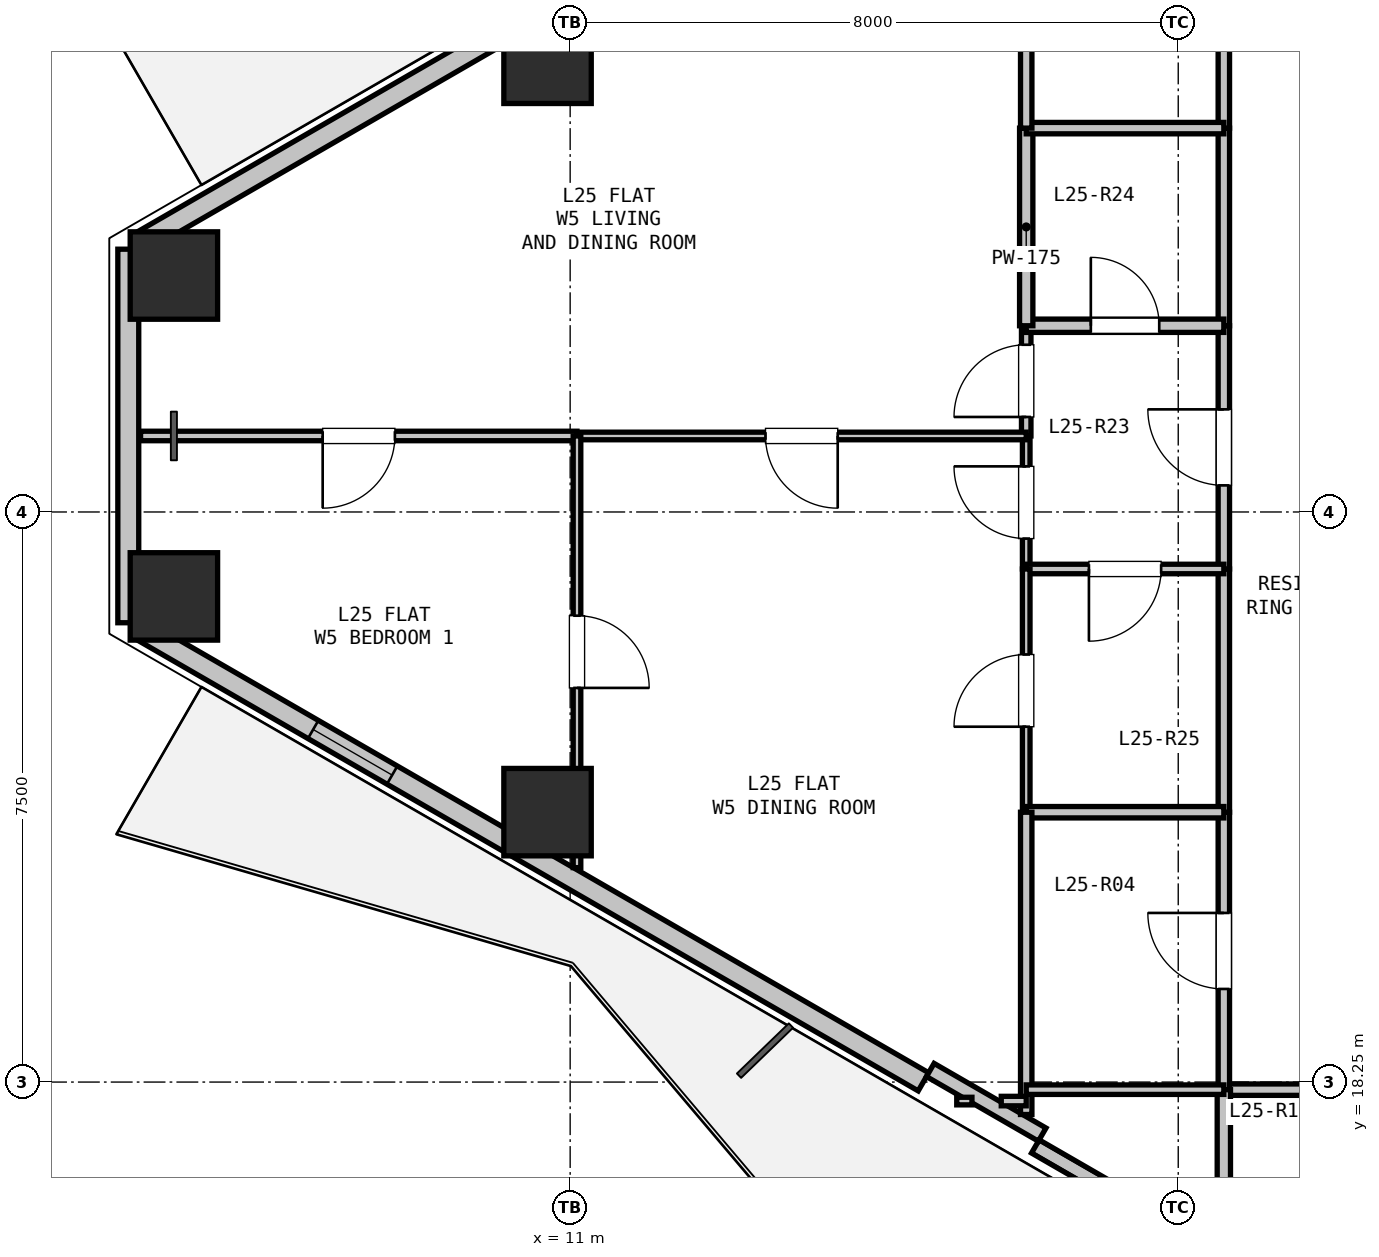
"""IFC4 building model, lengths in metres.
Left out: names, types, materials, properties, quantities, classifications, styles, units other than length and angle.
Written with IfcOpenShell. Run it as: python <this file> out.ifc"""

import sys

from ifc_helpers import new_model, si_unit, direction, frame, frame_2d, origin, origin_2d, place, context, subcontext, project, spatial, rectangle, hollow_rectangle, extrude, element, fill, save


model = new_model("IFC4")
c1 = context("Model", 3, precision=1e-05, world=origin(), true_north=direction((0.0, 1.0)))
c2 = subcontext(c1, "Body", "Model", "MODEL_VIEW")
j1 = project(units=[si_unit("LENGTHUNIT", "METRE"), si_unit("PLANEANGLEUNIT", "RADIAN")], contexts=[c1])
p1 = place(None, origin())
s1 = spatial("IfcSite", under=j1, at=p1, CompositionType="ELEMENT")
p2 = place(p1, origin())
s2 = spatial("IfcBuilding", under=s1, at=p2, CompositionType="ELEMENT")
p3 = place(p2, frame((0.0, 0.0, 93.3)))
s3 = spatial("IfcBuildingStorey", under=s2, at=p3, CompositionType="ELEMENT", Elevation=93.3)
for number, where, z_axis, x_axis in (
    (1, (5.787, 28.861, 0.0), (0.0, 0.0, 1.0), (1.0, 0.0, 0.0)),
    (2, (10.702, 31.699, 0.0), (0.0, 0.0, 1.0), (1.0, 0.0, 0.0)),
    (3, (10.702, 21.801, 0.0), (0.0, 0.0, 1.0), (1.0, 0.0, 0.0)),
    (4, (5.787, 24.639, 0.0), (0.0, 0.0, 1.0), (1.0, 0.0, 0.0)),
):
    element("IfcColumn", number, at=place(p3, frame(where, z_axis=z_axis, x_axis=x_axis)), inside=s3, PredefinedType="COLUMN", context=c2, shape_type="SweptSolid", body=[
        extrude(hollow_rectangle(XDim=1.15, YDim=1.15, WallThickness=0.032, at=origin_2d()), origin(), (0.0, 0.0, 1.0), 3.3),
    ])
p4 = place(p3, frame((5.187, 24.293, 0.0), z_axis=(0.0, 0.0, 1.0), x_axis=(0.0, 1.0, 0.0)))
e5 = element("IfcWall", 5, at=p4, inside=s3, PredefinedType="SOLIDWALL", context=c2, shape_type="SweptSolid", body=[
    extrude(rectangle(XDim=4.915, YDim=0.275, at=frame_2d((2.457, 0.0))), origin(), (0.0, 0.0, 1.0), 2.67),
])
p5 = place(p3, frame((5.317, 29.282, 0.0), z_axis=(0.0, 0.0, 1.0), x_axis=(0.866023023012, 0.500004123596, 0.0)))
e6 = element("IfcWall", 6, at=p5, inside=s3, PredefinedType="SOLIDWALL", context=c2, shape_type="SweptSolid", body=[
    extrude(rectangle(XDim=11.93, YDim=0.275, at=frame_2d((5.965, 0.0))), origin(), (0.0, 0.0, 1.0), 2.67),
])
p6 = place(p5, frame((8.704, 0.0, 0.0)))
e7 = element("IfcOpeningElement", 7, at=p6, cuts=e6, PredefinedType="OPENING", context=c2, shape_type="SweptSolid", body=[
    extrude(rectangle(XDim=1.1, YDim=2.1, at=frame_2d((0.55, 1.05))), frame((0.0, 0.147, 0.0), z_axis=(0.0, -1.0, 0.0), x_axis=(1.0, 0.0, 0.0)), (0.0, 0.0, 1.0), 0.295),
])
p7 = place(p3, frame((26.845, 11.788, 0.0), z_axis=(0.0, 0.0, 1.0), x_axis=(-0.866027010039, 0.499997217876, 0.0)))
e8 = element("IfcWall", 8, at=p7, inside=s3, PredefinedType="PARAPET", context=c2, shape_type="SweptSolid", body=[
    extrude(rectangle(XDim=11.229, YDim=0.2, at=frame_2d((5.615, 0.0))), origin(), (0.0, 0.0, 1.0), 0.2),
])
p8 = place(p3, frame((15.648, 18.253, 0.0), z_axis=(0.0, 0.0, 1.0), x_axis=(-0.866023023012, 0.500004123596, 0.0)))
e9 = element("IfcWall", 9, at=p8, inside=s3, PredefinedType="SOLIDWALL", context=c2, shape_type="SweptSolid", body=[
    extrude(rectangle(XDim=11.93, YDim=0.275, at=frame_2d((5.965, 0.0))), origin(), (0.0, 0.0, 1.0), 2.67),
])
p9 = place(p8, frame((8.071, 0.0, 0.9)))
e10 = element("IfcOpeningElement", 10, at=p9, cuts=e9, PredefinedType="OPENING", context=c2, shape_type="SweptSolid", body=[
    extrude(rectangle(XDim=1.2, YDim=1.4, at=frame_2d((0.6, 0.7))), frame((0.0, 0.147, 0.0), z_axis=(0.0, -1.0, 0.0), x_axis=(1.0, 0.0, 0.0)), (0.0, 0.0, 1.0), 0.295),
])
p10 = place(p3, frame((17.21, 17.559, 0.0), z_axis=(0.0, 0.0, 1.0), x_axis=(-0.866025371046, 0.500000056704, 0.0)))
e11 = element("IfcWall", 11, at=p10, inside=s3, PredefinedType="PARAPET", context=c2, shape_type="SweptSolid", body=[
    extrude(rectangle(XDim=1.7, YDim=0.2, at=frame_2d((0.85, 0.0))), origin(), (0.0, 0.0, 1.0), 2.67),
])
p11 = place(p3, frame((21.6, 18.15, 0.0), z_axis=(0.0, 0.0, 1.0), x_axis=(-1.0, 0.0, 0.0)))
e12 = element("IfcWall", 12, at=p11, inside=s3, PredefinedType="PARTITIONING", context=c2, shape_type="SweptSolid", body=[
    extrude(rectangle(XDim=2.0, YDim=0.15, at=frame_2d((1.0, 0.0))), origin(), (0.0, 0.0, 1.0), 3.05),
])
p12 = place(p3, frame((19.6, 18.15, 0.0), z_axis=(0.0, 0.0, 1.0), x_axis=(0.0, 1.0, 0.0)))
e13 = element("IfcWall", 13, at=p12, inside=s3, PredefinedType="PARTITIONING", context=c2, shape_type="SweptSolid", body=[
    extrude(rectangle(XDim=3.65, YDim=0.15, at=frame_2d((1.825, 0.0))), origin(), (0.0, 0.0, 1.0), 2.423),
])
p13 = place(p12, frame((1.325, 0.0, 0.0)))
e14 = element("IfcOpeningElement", 14, at=p13, cuts=e13, PredefinedType="OPENING", context=c2, shape_type="SweptSolid", body=[
    extrude(rectangle(XDim=1.0, YDim=2.15, at=frame_2d((0.5, 1.075))), frame((0.0, 0.085, 0.0), z_axis=(0.0, -1.0, 0.0), x_axis=(1.0, 0.0, 0.0)), (0.0, 0.0, 1.0), 0.17),
])
p14 = place(p3, frame((19.6, 21.8, 0.0), z_axis=(0.0, 0.0, 1.0), x_axis=(0.0, 1.0, 0.0)))
e15 = element("IfcWall", 15, at=p14, inside=s3, PredefinedType="PARTITIONING", context=c2, shape_type="SweptSolid", body=[
    extrude(rectangle(XDim=3.2, YDim=0.15, at=frame_2d((1.6, 0.0))), origin(), (0.0, 0.0, 1.0), 3.05),
])
p15 = place(p3, frame((19.6, 25.0, 0.0), z_axis=(0.0, 0.0, 1.0), x_axis=(0.0, 1.0, 0.0)))
e16 = element("IfcWall", 16, at=p15, inside=s3, PredefinedType="PARTITIONING", context=c2, shape_type="SweptSolid", body=[
    extrude(rectangle(XDim=3.2, YDim=0.15, at=frame_2d((1.6, 0.0))), origin(), (0.0, 0.0, 1.0), 3.05),
])
p16 = place(p15, frame((1.1, 0.0, 0.0)))
e17 = element("IfcOpeningElement", 17, at=p16, cuts=e16, PredefinedType="OPENING", context=c2, shape_type="SweptSolid", body=[
    extrude(rectangle(XDim=1.0, YDim=2.15, at=frame_2d((0.5, 1.075))), frame((0.0, 0.085, 0.0), z_axis=(0.0, -1.0, 0.0), x_axis=(1.0, 0.0, 0.0)), (0.0, 0.0, 1.0), 0.17),
])
p17 = place(p3, frame((19.6, 28.2, 0.0), z_axis=(0.0, 0.0, 1.0), x_axis=(0.0, 1.0, 0.0)))
e18 = element("IfcWall", 18, at=p17, inside=s3, PredefinedType="PARTITIONING", context=c2, shape_type="SweptSolid", body=[
    extrude(rectangle(XDim=2.6, YDim=0.15, at=frame_2d((1.3, 0.0))), origin(), (0.0, 0.0, 1.0), 3.05),
])
p18 = place(p3, frame((19.6, 30.8, 0.0), z_axis=(0.0, 0.0, 1.0), x_axis=(0.0, 1.0, 0.0)))
e19 = element("IfcWall", 19, at=p18, inside=s3, PredefinedType="PARTITIONING", context=c2, shape_type="SweptSolid", body=[
    extrude(rectangle(XDim=4.55, YDim=0.15, at=frame_2d((2.275, 0.0))), origin(), (0.0, 0.0, 1.0), 2.423),
])
p19 = place(p18, frame((1.775, 0.0, 0.0)))
e20 = element("IfcOpeningElement", 20, at=p19, cuts=e19, PredefinedType="OPENING", context=c2, shape_type="SweptSolid", body=[
    extrude(rectangle(XDim=1.0, YDim=2.15, at=frame_2d((0.5, 1.075))), frame((0.0, 0.085, 0.0), z_axis=(0.0, -1.0, 0.0), x_axis=(1.0, 0.0, 0.0)), (0.0, 0.0, 1.0), 0.17),
])
p20 = place(p3, frame((17.0, 25.0, 0.0), z_axis=(0.0, 0.0, 1.0), x_axis=(0.0, 1.0, 0.0)))
e21 = element("IfcWall", 21, at=p20, inside=s3, PredefinedType="PARTITIONING", context=c2, shape_type="SweptSolid", body=[
    extrude(rectangle(XDim=1.75, YDim=0.1, at=frame_2d((0.875, 0.0))), origin(), (0.0, 0.0, 1.0), 3.05),
])
p21 = place(p20, frame((0.4, 0.0, 0.0)))
e22 = element("IfcOpeningElement", 22, at=p21, cuts=e21, PredefinedType="OPENING", context=c2, shape_type="SweptSolid", body=[
    extrude(rectangle(XDim=0.95, YDim=2.1, at=frame_2d((0.475, 1.05))), frame((0.0, 0.06, 0.0), z_axis=(0.0, -1.0, 0.0), x_axis=(1.0, 0.0, 0.0)), (0.0, 0.0, 1.0), 0.12),
])
p22 = place(p3, frame((17.0, 26.75, 0.0), z_axis=(0.0, 0.0, 1.0), x_axis=(0.0, 1.0, 0.0)))
e23 = element("IfcWall", 23, at=p22, inside=s3, PredefinedType="PARTITIONING", context=c2, shape_type="SweptSolid", body=[
    extrude(rectangle(XDim=1.45, YDim=0.125, at=frame_2d((0.725, 0.0))), origin(), (0.0, 0.0, 1.0), 3.05),
])
p23 = place(p22, frame((0.25, 0.0, 0.0)))
e24 = element("IfcOpeningElement", 24, at=p23, cuts=e23, PredefinedType="OPENING", context=c2, shape_type="SweptSolid", body=[
    extrude(rectangle(XDim=0.95, YDim=2.1, at=frame_2d((0.475, 1.05))), frame((0.0, 0.073, 0.0), z_axis=(0.0, -1.0, 0.0), x_axis=(1.0, 0.0, 0.0)), (0.0, 0.0, 1.0), 0.145),
])
p24 = place(p3, frame((17.0, 28.2, 0.0), z_axis=(0.0, 0.0, 1.0), x_axis=(1.0, 0.0, 0.0)))
e25 = element("IfcWall", 25, at=p24, inside=s3, PredefinedType="PLUMBINGWALL", context=c2, shape_type="SweptSolid", body=[
    extrude(rectangle(XDim=2.6, YDim=0.175, at=frame_2d((1.3, 0.0))), origin(), (0.0, 0.0, 1.0), 3.05),
])
p25 = place(p24, frame((0.85, 0.0, 0.0)))
e26 = element("IfcOpeningElement", 26, at=p25, cuts=e25, PredefinedType="OPENING", context=c2, shape_type="SweptSolid", body=[
    extrude(rectangle(XDim=0.9, YDim=2.1, at=frame_2d((0.45, 1.05))), frame((0.0, 0.097, 0.0), z_axis=(0.0, -1.0, 0.0), x_axis=(1.0, 0.0, 0.0)), (0.0, 0.0, 1.0), 0.195),
])
p26 = place(p3, frame((19.6, 25.0, 0.0), z_axis=(0.0, 0.0, 1.0), x_axis=(-1.0, 0.0, 0.0)))
e27 = element("IfcWall", 27, at=p26, inside=s3, PredefinedType="PARTITIONING", context=c2, shape_type="SweptSolid", body=[
    extrude(rectangle(XDim=2.6, YDim=0.125, at=frame_2d((1.3, 0.0))), origin(), (0.0, 0.0, 1.0), 3.05),
])
p27 = place(p26, frame((0.825, 0.0, 0.0)))
e28 = element("IfcOpeningElement", 28, at=p27, cuts=e27, PredefinedType="OPENING", context=c2, shape_type="SweptSolid", body=[
    extrude(rectangle(XDim=0.95, YDim=2.1, at=frame_2d((0.475, 1.05))), frame((0.0, 0.073, 0.0), z_axis=(0.0, -1.0, 0.0), x_axis=(1.0, 0.0, 0.0)), (0.0, 0.0, 1.0), 0.145),
])
p28 = place(p3, frame((19.6, 16.013, 0.0), z_axis=(0.0, 0.0, 1.0), x_axis=(0.0, 1.0, 0.0)))
e29 = element("IfcWall", 29, at=p28, inside=s3, PredefinedType="PLUMBINGWALL", context=c2, shape_type="SweptSolid", body=[
    extrude(rectangle(XDim=2.137, YDim=0.175, at=frame_2d((1.068, 0.0))), origin(), (0.0, 0.0, 1.0), 2.365),
])
p29 = place(p3, frame((17.0, 28.2, 0.0), z_axis=(0.0, 0.0, 1.0), x_axis=(0.0, 1.0, 0.0)))
e30 = element("IfcWall", 30, at=p29, inside=s3, PredefinedType="PLUMBINGWALL", context=c2, shape_type="SweptSolid", body=[
    extrude(rectangle(XDim=2.6, YDim=0.175, at=frame_2d((1.3, 0.0))), origin(), (0.0, 0.0, 1.0), 3.05),
])
p30 = place(p3, frame((17.0, 30.8, 0.0), z_axis=(0.0, 0.0, 1.0), x_axis=(1.0, 0.0, 0.0)))
e31 = element("IfcWall", 31, at=p30, inside=s3, PredefinedType="PARTITIONING", context=c2, shape_type="SweptSolid", body=[
    extrude(rectangle(XDim=2.6, YDim=0.15, at=frame_2d((1.3, 0.0))), origin(), (0.0, 0.0, 1.0), 3.05),
])
p31 = place(p3, frame((17.0, 21.8, 0.0), z_axis=(0.0, 0.0, 1.0), x_axis=(0.0, 1.0, 0.0)))
e32 = element("IfcWall", 32, at=p31, inside=s3, PredefinedType="PARTITIONING", context=c2, shape_type="SweptSolid", body=[
    extrude(rectangle(XDim=3.2, YDim=0.1, at=frame_2d((1.6, 0.0))), origin(), (0.0, 0.0, 1.0), 2.423),
])
p32 = place(p31, frame((1.125, 0.0, 0.0)))
e33 = element("IfcOpeningElement", 33, at=p32, cuts=e32, PredefinedType="OPENING", context=c2, shape_type="SweptSolid", body=[
    extrude(rectangle(XDim=0.95, YDim=2.1, at=frame_2d((0.475, 1.05))), frame((0.0, 0.06, 0.0), z_axis=(0.0, -1.0, 0.0), x_axis=(1.0, 0.0, 0.0)), (0.0, 0.0, 1.0), 0.12),
])
p33 = place(p3, frame((19.6, 21.8, 0.0), z_axis=(0.0, 0.0, 1.0), x_axis=(-1.0, 0.0, 0.0)))
e34 = element("IfcWall", 34, at=p33, inside=s3, PredefinedType="PARTITIONING", context=c2, shape_type="SweptSolid", body=[
    extrude(rectangle(XDim=2.6, YDim=0.15, at=frame_2d((1.3, 0.0))), origin(), (0.0, 0.0, 1.0), 2.423),
])
p34 = place(p3, frame((17.0, 30.8, 0.0), z_axis=(0.0, 0.0, 1.0), x_axis=(0.0, 1.0, 0.0)))
e35 = element("IfcWall", 35, at=p34, inside=s3, PredefinedType="PARTITIONING", context=c2, shape_type="SweptSolid", body=[
    extrude(rectangle(XDim=4.55, YDim=0.15, at=frame_2d((2.275, 0.0))), origin(), (0.0, 0.0, 1.0), 2.365),
])
p35 = place(p3, frame((17.0, 17.823, 0.0), z_axis=(0.0, 0.0, 1.0), x_axis=(0.0, 1.0, 0.0)))
e36 = element("IfcWall", 36, at=p35, inside=s3, PredefinedType="PARTITIONING", context=c2, shape_type="SweptSolid", body=[
    extrude(rectangle(XDim=3.977, YDim=0.15, at=frame_2d((1.988, 0.0))), origin(), (0.0, 0.0, 1.0), 2.365),
])
p36 = place(p3, frame((19.6, 18.15, 0.0), z_axis=(0.0, 0.0, 1.0), x_axis=(-1.0, 0.0, 0.0)))
e37 = element("IfcWall", 37, at=p36, inside=s3, PredefinedType="PARTITIONING", context=c2, shape_type="SweptSolid", body=[
    extrude(rectangle(XDim=2.6, YDim=0.125, at=frame_2d((1.3, 0.0))), origin(), (0.0, 0.0, 1.0), 2.365),
])
p37 = place(p3, frame((17.0, 26.75, 0.0), z_axis=(0.0, 0.0, 1.0), x_axis=(-1.0, 0.0, 0.0)))
e38 = element("IfcWall", 38, at=p37, inside=s3, PredefinedType="PARTITIONING", context=c2, shape_type="SweptSolid", body=[
    extrude(rectangle(XDim=5.91, YDim=0.1, at=frame_2d((2.955, 0.0))), origin(), (0.0, 0.0, 1.0), 3.05),
])
p38 = place(p37, frame((2.48, 0.0, 0.0)))
e39 = element("IfcOpeningElement", 39, at=p38, cuts=e38, PredefinedType="OPENING", context=c2, shape_type="SweptSolid", body=[
    extrude(rectangle(XDim=0.95, YDim=2.1, at=frame_2d((0.475, 1.05))), frame((0.0, 0.06, 0.0), z_axis=(0.0, -1.0, 0.0), x_axis=(1.0, 0.0, 0.0)), (0.0, 0.0, 1.0), 0.12),
])
p39 = place(p3, frame((11.09, 26.75, 0.0), z_axis=(0.0, 0.0, 1.0), x_axis=(-1.0, 0.0, 0.0)))
e40 = element("IfcWall", 40, at=p39, inside=s3, PredefinedType="PARTITIONING", context=c2, shape_type="SweptSolid", body=[
    extrude(rectangle(XDim=5.742, YDim=0.125, at=frame_2d((2.871, 0.0))), origin(), (0.0, 0.0, 1.0), 2.714),
])
p40 = place(p39, frame((2.396, 0.0, 0.0)))
e41 = element("IfcOpeningElement", 41, at=p40, cuts=e40, PredefinedType="OPENING", context=c2, shape_type="SweptSolid", body=[
    extrude(rectangle(XDim=0.95, YDim=2.1, at=frame_2d((0.475, 1.05))), frame((0.0, 0.073, 0.0), z_axis=(0.0, -1.0, 0.0), x_axis=(1.0, 0.0, 0.0)), (0.0, 0.0, 1.0), 0.145),
])
p41 = place(p3, frame((11.09, 26.75, 0.0), z_axis=(0.0, 0.0, 1.0), x_axis=(0.0, -1.0, 0.0)))
e42 = element("IfcWall", 42, at=p41, inside=s3, PredefinedType="PARTITIONING", context=c2, shape_type="SweptSolid", body=[
    extrude(rectangle(XDim=5.679, YDim=0.1, at=frame_2d((2.839, 0.0))), origin(), (0.0, 0.0, 1.0), 2.423),
])
p42 = place(p41, frame((2.365, 0.0, 0.0)))
e43 = element("IfcOpeningElement", 43, at=p42, cuts=e42, PredefinedType="OPENING", context=c2, shape_type="SweptSolid", body=[
    extrude(rectangle(XDim=0.95, YDim=2.1, at=frame_2d((0.475, 1.05))), frame((0.0, 0.06, 0.0), z_axis=(0.0, -1.0, 0.0), x_axis=(1.0, 0.0, 0.0)), (0.0, 0.0, 1.0), 0.12),
])
p43 = place(p3, frame((17.0, 18.0, 0.0), z_axis=(0.0, 0.0, 1.0), x_axis=(-1.0, 0.0, 0.0)))
e44 = element("IfcWall", 44, at=p43, inside=s3, PredefinedType="PARTITIONING", context=c2, shape_type="SweptSolid", body=[
    extrude(rectangle(XDim=0.328, YDim=0.125, at=frame_2d((0.164, 0.0))), origin(), (0.0, 0.0, 1.0), 2.714),
])
p44 = place(p3, frame((16.286, 18.0, 0.0), z_axis=(0.0, 0.0, 1.0), x_axis=(-1.0, 0.0, 0.0)))
e45 = element("IfcWall", 45, at=p44, inside=s3, PredefinedType="PARTITIONING", context=c2, shape_type="SweptSolid", body=[
    extrude(rectangle(XDim=0.2, YDim=0.1, at=frame_2d((0.1, 0.0))), origin(), (0.0, 0.0, 1.0), 3.05),
])
p45 = place(p9, origin())
e46 = element("IfcWindow", 46, at=p45, inside=s3, PartitioningType="SINGLE_PANEL", PredefinedType="WINDOW", context=c2, shape_type="SweptSolid", body=[
    extrude(rectangle(XDim=1.2, YDim=1.4, at=frame_2d((0.6, 0.7))), frame((0.0, 0.03, 0.0), z_axis=(0.0, -1.0, 0.0), x_axis=(1.0, 0.0, 0.0)), (0.0, 0.0, 1.0), 0.06),
])
fill(e10, e46)
p46 = place(p16, origin())
e47 = element("IfcDoor", 47, at=p46, inside=s3, OperationType="SINGLE_SWING_RIGHT", PredefinedType="DOOR", context=c2, shape_type="SweptSolid", body=[
    extrude(rectangle(XDim=1.0, YDim=2.15, at=frame_2d((0.5, 1.075))), frame((0.0, 0.025, 0.0), z_axis=(0.0, -1.0, 0.0), x_axis=(1.0, 0.0, 0.0)), (0.0, 0.0, 1.0), 0.05),
])
fill(e17, e47)
p47 = place(p13, origin())
e48 = element("IfcDoor", 48, at=p47, inside=s3, OperationType="SINGLE_SWING_RIGHT", PredefinedType="DOOR", context=c2, shape_type="SweptSolid", body=[
    extrude(rectangle(XDim=1.0, YDim=2.15, at=frame_2d((0.5, 1.075))), frame((0.0, 0.025, 0.0), z_axis=(0.0, -1.0, 0.0), x_axis=(1.0, 0.0, 0.0)), (0.0, 0.0, 1.0), 0.05),
])
fill(e14, e48)
p48 = place(p25, origin())
e49 = element("IfcDoor", 49, at=p48, inside=s3, OperationType="SINGLE_SWING_LEFT", PredefinedType="DOOR", context=c2, shape_type="SweptSolid", body=[
    extrude(rectangle(XDim=0.9, YDim=2.1, at=frame_2d((0.45, 1.05))), frame((0.0, 0.025, 0.0), z_axis=(0.0, -1.0, 0.0), x_axis=(1.0, 0.0, 0.0)), (0.0, 0.0, 1.0), 0.05),
])
fill(e26, e49)
p49 = place(p27, origin())
e50 = element("IfcDoor", 50, at=p49, inside=s3, OperationType="SINGLE_SWING_RIGHT", PredefinedType="DOOR", context=c2, shape_type="SweptSolid", body=[
    extrude(rectangle(XDim=0.95, YDim=2.1, at=frame_2d((0.475, 1.05))), frame((0.0, 0.025, 0.0), z_axis=(0.0, -1.0, 0.0), x_axis=(1.0, 0.0, 0.0)), (0.0, 0.0, 1.0), 0.05),
])
fill(e28, e50)
p50 = place(p23, origin())
e51 = element("IfcDoor", 51, at=p50, inside=s3, OperationType="SINGLE_SWING_LEFT", PredefinedType="DOOR", context=c2, shape_type="SweptSolid", body=[
    extrude(rectangle(XDim=0.95, YDim=2.1, at=frame_2d((0.475, 1.05))), frame((0.0, 0.025, 0.0), z_axis=(0.0, -1.0, 0.0), x_axis=(1.0, 0.0, 0.0)), (0.0, 0.0, 1.0), 0.05),
])
fill(e24, e51)
p51 = place(p21, origin())
e52 = element("IfcDoor", 52, at=p51, inside=s3, OperationType="SINGLE_SWING_RIGHT", PredefinedType="DOOR", context=c2, shape_type="SweptSolid", body=[
    extrude(rectangle(XDim=0.95, YDim=2.1, at=frame_2d((0.475, 1.05))), frame((0.0, 0.025, 0.0), z_axis=(0.0, -1.0, 0.0), x_axis=(1.0, 0.0, 0.0)), (0.0, 0.0, 1.0), 0.05),
])
fill(e22, e52)
p52 = place(p32, origin())
e53 = element("IfcDoor", 53, at=p52, inside=s3, OperationType="SINGLE_SWING_LEFT", PredefinedType="DOOR", context=c2, shape_type="SweptSolid", body=[
    extrude(rectangle(XDim=0.95, YDim=2.1, at=frame_2d((0.475, 1.05))), frame((0.0, 0.025, 0.0), z_axis=(0.0, -1.0, 0.0), x_axis=(1.0, 0.0, 0.0)), (0.0, 0.0, 1.0), 0.05),
])
fill(e33, e53)
p53 = place(p40, origin())
e54 = element("IfcDoor", 54, at=p53, inside=s3, OperationType="SINGLE_SWING_RIGHT", PredefinedType="DOOR", context=c2, shape_type="SweptSolid", body=[
    extrude(rectangle(XDim=0.95, YDim=2.1, at=frame_2d((0.475, 1.05))), frame((0.0, 0.025, 0.0), z_axis=(0.0, -1.0, 0.0), x_axis=(1.0, 0.0, 0.0)), (0.0, 0.0, 1.0), 0.05),
])
fill(e41, e54)
p54 = place(p38, origin())
e55 = element("IfcDoor", 55, at=p54, inside=s3, OperationType="SINGLE_SWING_LEFT", PredefinedType="DOOR", context=c2, shape_type="SweptSolid", body=[
    extrude(rectangle(XDim=0.95, YDim=2.1, at=frame_2d((0.475, 1.05))), frame((0.0, 0.025, 0.0), z_axis=(0.0, -1.0, 0.0), x_axis=(1.0, 0.0, 0.0)), (0.0, 0.0, 1.0), 0.05),
])
fill(e39, e55)
p55 = place(p42, origin())
e56 = element("IfcDoor", 56, at=p55, inside=s3, OperationType="SINGLE_SWING_RIGHT", PredefinedType="DOOR", context=c2, shape_type="SweptSolid", body=[
    extrude(rectangle(XDim=0.95, YDim=2.1, at=frame_2d((0.475, 1.05))), frame((0.0, 0.025, 0.0), z_axis=(0.0, -1.0, 0.0), x_axis=(1.0, 0.0, 0.0)), (0.0, 0.0, 1.0), 0.05),
])
fill(e43, e56)
save(model, sys.argv[1])
